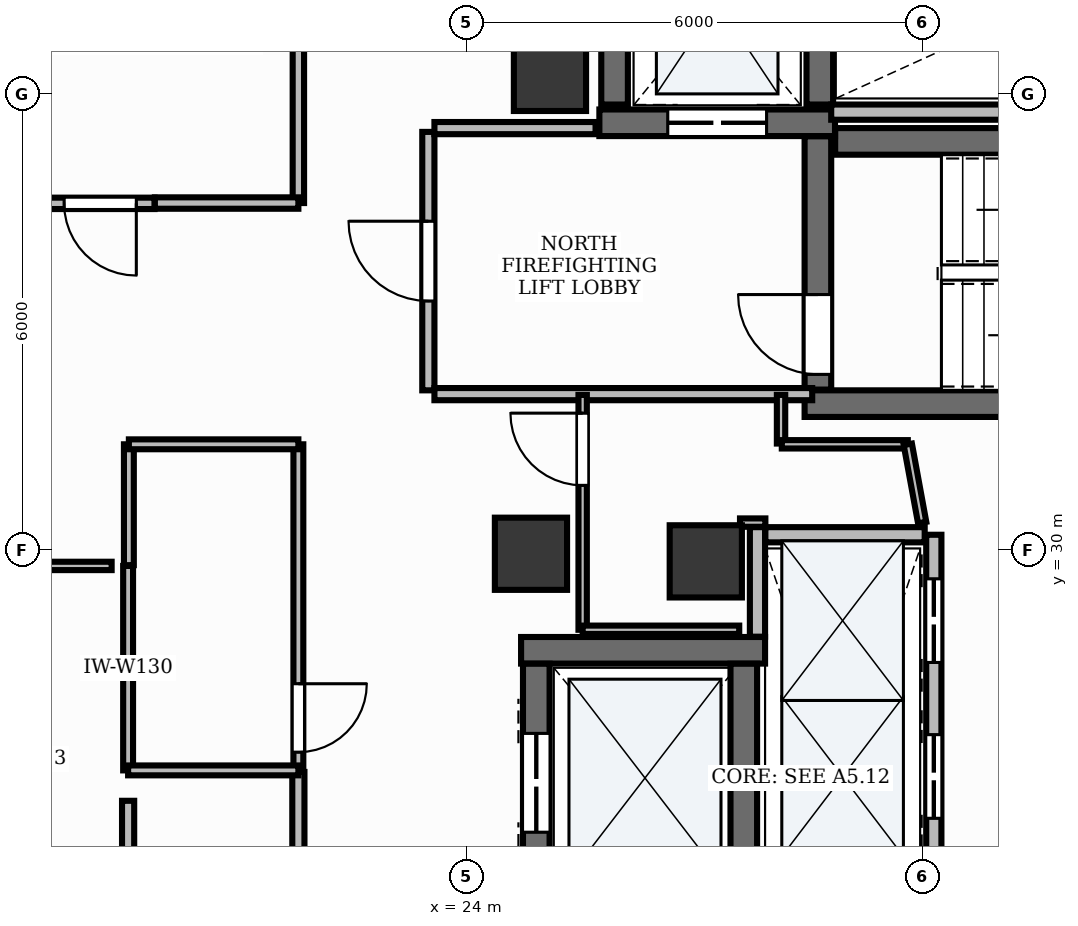
"""IFC4 building model, lengths in metres.
Left out: names, types, materials, properties, quantities, classifications, styles, units other than length and angle.
Written with IfcOpenShell. Run it as: python <this file> out.ifc"""

import sys

from ifc_helpers import new_model, si_unit, direction, frame, frame_2d, origin, origin_2d, place, context, subcontext, project, spatial, rectangle, extrude, element, fill, save


model = new_model("IFC4")
c1 = context("Model", 3, precision=1e-05, world=origin(), true_north=direction((0.0, 1.0)))
c2 = subcontext(c1, "Body", "Model", "MODEL_VIEW")
j1 = project(units=[si_unit("LENGTHUNIT", "METRE"), si_unit("PLANEANGLEUNIT", "RADIAN")], contexts=[c1])
p1 = place(None, origin())
s1 = spatial("IfcSite", under=j1, at=p1, CompositionType="ELEMENT")
p2 = place(p1, origin())
s2 = spatial("IfcBuilding", under=s1, at=p2, CompositionType="ELEMENT")
p3 = place(p2, frame((0.0, 0.0, 282.6)))
s3 = spatial("IfcBuildingStorey", under=s2, at=p3, CompositionType="ELEMENT", Elevation=282.6)
p4 = place(p3, frame((28.852, 35.375, 0.0), z_axis=(0.0, 0.0, 1.0), x_axis=(1.0, 0.0, 0.0)))
e1 = element("IfcWall", 1, at=p4, inside=s3, PredefinedType="SHEAR", context=c2, shape_type="SweptSolid", body=[
    extrude(rectangle(XDim=8.148, YDim=0.35, at=frame_2d((4.074, 0.0))), origin(), (0.0, 0.0, 1.0), 3.79),
])
p5 = place(p3, frame((28.45, 31.925, 0.0), z_axis=(0.0, 0.0, 1.0), x_axis=(1.0, 0.0, 0.0)))
e2 = element("IfcWall", 2, at=p5, inside=s3, PredefinedType="SHEAR", context=c2, shape_type="SweptSolid", body=[
    extrude(rectangle(XDim=8.55, YDim=0.35, at=frame_2d((4.275, 0.0))), origin(), (0.0, 0.0, 1.0), 3.79),
])
p6 = place(p3, frame((28.625, 32.11, 0.0), z_axis=(0.0, 0.0, 1.0), x_axis=(0.0, 1.0, 0.0)))
e3 = element("IfcWall", 3, at=p6, inside=s3, PredefinedType="SHEAR", context=c2, shape_type="SweptSolid", body=[
    extrude(rectangle(XDim=3.333, YDim=0.35, at=frame_2d((1.667, 0.0))), origin(), (0.0, 0.0, 1.0), 3.79),
])
p7 = place(p6, frame((0.2, 0.0, 0.0)))
e4 = element("IfcOpeningElement", 4, at=p7, cuts=e3, PredefinedType="OPENING", context=c2, shape_type="SweptSolid", body=[
    extrude(rectangle(XDim=1.05, YDim=2.15, at=frame_2d((0.525, 1.075))), frame((0.0, 0.19, 0.0), z_axis=(0.0, -1.0, 0.0), x_axis=(1.0, 0.0, 0.0)), (0.0, 0.0, 1.0), 0.38),
])
p8 = place(p3, frame((25.75, 35.62, 0.0), z_axis=(0.0, 0.0, 1.0), x_axis=(1.0, 0.0, 0.0)))
e5 = element("IfcWall", 5, at=p8, inside=s3, PredefinedType="SHEAR", context=c2, shape_type="SweptSolid", body=[
    extrude(rectangle(XDim=3.1, YDim=0.35, at=frame_2d((1.55, 0.0))), origin(), (0.0, 0.0, 1.0), 3.79),
])
p9 = place(p8, frame((0.9, 0.0, 0.0)))
e6 = element("IfcOpeningElement", 6, at=p9, cuts=e5, PredefinedType="OPENING", context=c2, shape_type="SweptSolid", body=[
    extrude(rectangle(XDim=1.3, YDim=2.2, at=frame_2d((0.65, 1.1))), frame((0.0, 0.19, 0.0), z_axis=(0.0, -1.0, 0.0), x_axis=(1.0, 0.0, 0.0)), (0.0, 0.0, 1.0), 0.38),
])
for number, where, z_axis, x_axis in (
    (7, (25.95, 35.86, 0.0), (0.0, 0.0, 1.0), (0.0, 1.0, 0.0)),
    (8, (28.65, 35.86, 0.0), (0.0, 0.0, 1.0), (0.0, 1.0, 0.0)),
):
    element("IfcWall", number, at=place(p3, frame(where, z_axis=z_axis, x_axis=x_axis)), inside=s3, PredefinedType="SHEAR", context=c2, shape_type="SweptSolid", body=[
        extrude(rectangle(XDim=2.7, YDim=0.35, at=frame_2d((1.35, 0.0))), origin(), (0.0, 0.0, 1.0), 3.79),
    ])
p10 = place(p3, frame((24.72, 28.68, 0.0), z_axis=(0.0, 0.0, 1.0), x_axis=(1.0, 0.0, 0.0)))
e9 = element("IfcWall", 9, at=p10, inside=s3, PredefinedType="SHEAR", context=c2, shape_type="SweptSolid", body=[
    extrude(rectangle(XDim=3.21, YDim=0.35, at=frame_2d((1.605, 0.0))), origin(), (0.0, 0.0, 1.0), 3.79),
])
p11 = place(p3, frame((24.92, 25.497, 0.0), z_axis=(0.0, 0.0, 1.0), x_axis=(0.0, 1.0, 0.0)))
e10 = element("IfcWall", 10, at=p11, inside=s3, PredefinedType="SHEAR", context=c2, shape_type="SweptSolid", body=[
    extrude(rectangle(XDim=3.006, YDim=0.35, at=frame_2d((1.503, 0.0))), origin(), (0.0, 0.0, 1.0), 3.79),
])
p12 = place(p11, frame((0.79, 0.0, 0.0)))
e11 = element("IfcOpeningElement", 11, at=p12, cuts=e10, PredefinedType="OPENING", context=c2, shape_type="SweptSolid", body=[
    extrude(rectangle(XDim=1.3, YDim=2.2, at=frame_2d((0.65, 1.1))), frame((0.0, 0.19, 0.0), z_axis=(0.0, -1.0, 0.0), x_axis=(1.0, 0.0, 0.0)), (0.0, 0.0, 1.0), 0.38),
])
p13 = place(p3, frame((27.65, 25.497, 0.0), z_axis=(0.0, 0.0, 1.0), x_axis=(0.0, 1.0, 0.0)))
e12 = element("IfcWall", 12, at=p13, inside=s3, PredefinedType="SHEAR", context=c2, shape_type="SweptSolid", body=[
    extrude(rectangle(XDim=3.006, YDim=0.35, at=frame_2d((1.503, 0.0))), origin(), (0.0, 0.0, 1.0), 3.79),
])
for number, where, z_axis, x_axis in (
    (13, (25.1, 36.25, -0.0), (0.0, 0.0, 1.0), (1.0, 0.0, 0.0)),
    (14, (24.85, 29.95, -0.0), (0.0, 0.0, 1.0), (1.0, 0.0, 0.0)),
    (15, (27.15, 29.85, -0.0), (0.0, 0.0, 1.0), (1.0, 0.0, 0.0)),
):
    element("IfcColumn", number, at=place(p3, frame(where, z_axis=z_axis, x_axis=x_axis)), inside=s3, PredefinedType="PILASTER", context=c2, shape_type="SweptSolid", body=[
        extrude(rectangle(XDim=0.95, YDim=0.95, at=origin_2d()), origin(), (0.0, 0.0, 1.0), 3.791),
    ])
p14 = place(p3, frame((27.83, 28.859, 0.0), z_axis=(0.0, 0.0, 1.0), x_axis=(0.0, 1.0, 0.0)))
e16 = element("IfcWall", 16, at=p14, inside=s3, PredefinedType="PARTITIONING", context=c2, shape_type="SweptSolid", body=[
    extrude(rectangle(XDim=1.441, YDim=0.2, at=frame_2d((0.721, 0.0))), origin(), (0.0, 0.0, 1.0), 2.8),
])
p15 = place(p3, frame((30.15, 23.85, 0.0), z_axis=(0.0, 0.0, 1.0), x_axis=(0.0, 1.0, 0.0)))
e17 = element("IfcWall", 17, at=p15, inside=s3, PredefinedType="PARTITIONING", context=c2, shape_type="SweptSolid", body=[
    extrude(rectangle(XDim=6.35, YDim=0.2, at=frame_2d((3.175, 0.0))), origin(), (0.0, 0.0, 1.0), 2.8),
])
p16 = place(p15, frame((0.58, 0.0, 0.0)))
e18 = element("IfcOpeningElement", 18, at=p16, cuts=e17, PredefinedType="OPENING", context=c2, shape_type="SweptSolid", body=[
    extrude(rectangle(XDim=1.1, YDim=2.2, at=frame_2d((0.55, 1.1))), frame((0.0, 0.115, 0.0), z_axis=(0.0, -1.0, 0.0), x_axis=(1.0, 0.0, 0.0)), (0.0, 0.0, 1.0), 0.23),
])
p17 = place(p15, frame((2.62, 0.0, 0.0)))
e19 = element("IfcOpeningElement", 19, at=p17, cuts=e17, PredefinedType="OPENING", context=c2, shape_type="SweptSolid", body=[
    extrude(rectangle(XDim=1.1, YDim=2.2, at=frame_2d((0.55, 1.1))), frame((0.0, 0.115, 0.0), z_axis=(0.0, -1.0, 0.0), x_axis=(1.0, 0.0, 0.0)), (0.0, 0.0, 1.0), 0.23),
])
p18 = place(p15, frame((4.67, 0.0, 0.0)))
e20 = element("IfcOpeningElement", 20, at=p18, cuts=e17, PredefinedType="OPENING", context=c2, shape_type="SweptSolid", body=[
    extrude(rectangle(XDim=1.1, YDim=2.2, at=frame_2d((0.55, 1.1))), frame((0.0, 0.115, 0.0), z_axis=(0.0, -1.0, 0.0), x_axis=(1.0, 0.0, 0.0)), (0.0, 0.0, 1.0), 0.23),
])
p19 = place(p3, frame((27.934, 30.2, 0.0), z_axis=(0.0, 0.0, 1.0), x_axis=(1.0, 0.0, 0.0)))
e21 = element("IfcWall", 21, at=p19, inside=s3, PredefinedType="PARTITIONING", context=c2, shape_type="SweptSolid", body=[
    extrude(rectangle(XDim=2.096, YDim=0.2, at=frame_2d((1.048, 0.0))), origin(), (0.0, 0.0, 1.0), 2.8),
])
p20 = place(p3, frame((28.8, 35.76, 0.0), z_axis=(0.0, 0.0, 1.0), x_axis=(1.0, 0.0, 0.0)))
e22 = element("IfcWall", 22, at=p20, inside=s3, PredefinedType="PARTITIONING", context=c2, shape_type="SweptSolid", body=[
    extrude(rectangle(XDim=4.57, YDim=0.2, at=frame_2d((2.285, 0.0))), origin(), (0.0, 0.0, 1.0), 2.8),
])
p21 = place(p3, frame((23.5, 32.1, 0.0), z_axis=(0.0, 0.0, 1.0), x_axis=(0.0, 1.0, 0.0)))
e23 = element("IfcWall", 23, at=p21, inside=s3, PredefinedType="PARTITIONING", context=c2, shape_type="SweptSolid", body=[
    extrude(rectangle(XDim=3.4, YDim=0.16, at=frame_2d((1.7, 0.0))), origin(), (0.0, 0.0, 1.0), 2.8),
])
p22 = place(p21, frame((1.175, 0.0, 0.0)))
e24 = element("IfcOpeningElement", 24, at=p22, cuts=e23, PredefinedType="OPENING", context=c2, shape_type="SweptSolid", body=[
    extrude(rectangle(XDim=1.05, YDim=2.15, at=frame_2d((0.525, 1.075))), frame((0.0, 0.095, 0.0), z_axis=(0.0, -1.0, 0.0), x_axis=(1.0, 0.0, 0.0)), (0.0, 0.0, 1.0), 0.19),
])
p23 = place(p3, frame((23.58, 32.05, 0.0), z_axis=(0.0, 0.0, 1.0), x_axis=(1.0, 0.0, 0.0)))
e25 = element("IfcWall", 25, at=p23, inside=s3, PredefinedType="PARTITIONING", context=c2, shape_type="SweptSolid", body=[
    extrude(rectangle(XDim=4.97, YDim=0.16, at=frame_2d((2.485, 0.0))), origin(), (0.0, 0.0, 1.0), 2.8),
])
p24 = place(p3, frame((23.58, 35.55, 0.0), z_axis=(0.0, 0.0, 1.0), x_axis=(1.0, 0.0, 0.0)))
e26 = element("IfcWall", 26, at=p24, inside=s3, PredefinedType="PARTITIONING", context=c2, shape_type="SweptSolid", body=[
    extrude(rectangle(XDim=2.12, YDim=0.16, at=frame_2d((1.06, 0.0))), origin(), (0.0, 0.0, 1.0), 2.8),
])
p25 = place(p3, frame((21.79, 31.39, 0.0), z_axis=(0.0, 0.0, 1.0), x_axis=(0.0, -1.0, 0.0)))
e27 = element("IfcWall", 27, at=p25, inside=s3, PredefinedType="PARTITIONING", context=c2, shape_type="SweptSolid", body=[
    extrude(rectangle(XDim=4.29, YDim=0.13, at=frame_2d((2.145, 0.0))), origin(), (0.0, 0.0, 1.0), 2.8),
])
p26 = place(p25, frame((3.15, 0.0, 0.0)))
e28 = element("IfcOpeningElement", 28, at=p26, cuts=e27, PredefinedType="OPENING", context=c2, shape_type="SweptSolid", body=[
    extrude(rectangle(XDim=0.9, YDim=2.15, at=frame_2d((0.45, 1.075))), frame((0.0, 0.08, 0.0), z_axis=(0.0, -1.0, 0.0), x_axis=(1.0, 0.0, 0.0)), (0.0, 0.0, 1.0), 0.16),
])
p27 = place(p3, frame((25.53, 28.95, 0.0), z_axis=(0.0, 0.0, 1.0), x_axis=(0.0, 1.0, 0.0)))
e29 = element("IfcWall", 29, at=p27, inside=s3, PredefinedType="MOVABLE", context=c2, shape_type="SweptSolid", body=[
    extrude(rectangle(XDim=3.09, YDim=0.11, at=frame_2d((1.545, 0.0))), origin(), (0.0, 0.0, 1.0), 2.8),
])
p28 = place(p27, frame((1.9, 0.0, 0.0)))
e30 = element("IfcOpeningElement", 30, at=p28, cuts=e29, PredefinedType="OPENING", context=c2, shape_type="SweptSolid", body=[
    extrude(rectangle(XDim=0.95, YDim=2.15, at=frame_2d((0.475, 1.075))), frame((0.0, 0.07, 0.0), z_axis=(0.0, -1.0, 0.0), x_axis=(1.0, 0.0, 0.0)), (0.0, 0.0, 1.0), 0.14),
])
p29 = place(p3, frame((19.898, 34.56, 0.0), z_axis=(0.0, 0.0, 1.0), x_axis=(-1.0, 0.0, 0.0)))
e31 = element("IfcWall", 31, at=p29, inside=s3, PredefinedType="PARTITIONING", context=c2, shape_type="SweptSolid", body=[
    extrude(rectangle(XDim=2.098, YDim=0.15, at=frame_2d((1.049, 0.0))), origin(), (0.0, 0.0, 1.0), 2.8),
])
p30 = place(p29, frame((0.24, 0.0, 0.0)))
e32 = element("IfcOpeningElement", 32, at=p30, cuts=e31, PredefinedType="OPENING", context=c2, shape_type="SweptSolid", body=[
    extrude(rectangle(XDim=0.95, YDim=2.15, at=frame_2d((0.475, 1.075))), frame((0.0, 0.09, 0.0), z_axis=(0.0, -1.0, 0.0), x_axis=(1.0, 0.0, 0.0)), (0.0, 0.0, 1.0), 0.18),
])
p31 = place(p3, frame((14.8, 29.79, 0.0), z_axis=(0.0, 0.0, 1.0), x_axis=(1.0, 0.0, 0.0)))
e33 = element("IfcWall", 33, at=p31, inside=s3, PredefinedType="MOVABLE", context=c2, shape_type="SweptSolid", body=[
    extrude(rectangle(XDim=4.533, YDim=0.11, at=frame_2d((2.267, 0.0))), origin(), (0.0, 0.0, 1.0), 2.8),
])
p32 = place(p31, frame((0.502, 0.0, 0.0)))
e34 = element("IfcOpeningElement", 34, at=p32, cuts=e33, PredefinedType="OPENING", context=c2, shape_type="SweptSolid", body=[
    extrude(rectangle(XDim=0.95, YDim=2.15, at=frame_2d((0.475, 1.075))), frame((0.0, 0.07, 0.0), z_axis=(0.0, -1.0, 0.0), x_axis=(1.0, 0.0, 0.0)), (0.0, 0.0, 1.0), 0.14),
])
p33 = place(p3, frame((21.79, 27.08, 0.0), z_axis=(0.0, 0.0, 1.0), x_axis=(0.0, -1.0, 0.0)))
e35 = element("IfcWall", 35, at=p33, inside=s3, PredefinedType="PARTITIONING", context=c2, shape_type="SweptSolid", body=[
    extrude(rectangle(XDim=4.67, YDim=0.16, at=frame_2d((2.335, 0.0))), origin(), (0.0, 0.0, 1.0), 2.8),
])
p34 = place(p3, frame((19.55, 24.21, 0.0), z_axis=(0.0, 0.0, 1.0), x_axis=(0.0, 1.0, 0.0)))
e36 = element("IfcWall", 36, at=p34, inside=s3, PredefinedType="PARTITIONING", context=c2, shape_type="SweptSolid", body=[
    extrude(rectangle(XDim=2.49, YDim=0.16, at=frame_2d((1.245, 0.0))), origin(), (0.0, 0.0, 1.0), 2.8),
])
p35 = place(p3, frame((19.55, 27.1, 0.0), z_axis=(0.0, 0.0, 1.0), x_axis=(0.0, 1.0, 0.0)))
e37 = element("IfcWall", 37, at=p35, inside=s3, PredefinedType="PARTITIONING", context=c2, shape_type="SweptSolid", body=[
    extrude(rectangle(XDim=2.69, YDim=0.13, at=frame_2d((1.345, 0.0))), origin(), (0.0, 0.0, 1.0), 2.8),
])
p36 = place(p3, frame((19.56, 29.8, 0.0), z_axis=(0.0, 0.0, 1.0), x_axis=(0.0, 1.0, 0.0)))
e38 = element("IfcWall", 38, at=p36, inside=s3, PredefinedType="PARTITIONING", context=c2, shape_type="SweptSolid", body=[
    extrude(rectangle(XDim=1.59, YDim=0.13, at=frame_2d((0.795, 0.0))), origin(), (0.0, 0.0, 1.0), 2.8),
])
p37 = place(p3, frame((19.56, 31.39, 0.0), z_axis=(0.0, 0.0, 1.0), x_axis=(1.0, 0.0, 0.0)))
e39 = element("IfcWall", 39, at=p37, inside=s3, PredefinedType="PARTITIONING", context=c2, shape_type="SweptSolid", body=[
    extrude(rectangle(XDim=2.23, YDim=0.13, at=frame_2d((1.115, 0.0))), origin(), (0.0, 0.0, 1.0), 2.8),
])
p38 = place(p3, frame((21.79, 27.1, 0.0), z_axis=(0.0, 0.0, 1.0), x_axis=(-1.0, 0.0, 0.0)))
e40 = element("IfcWall", 40, at=p38, inside=s3, PredefinedType="PARTITIONING", context=c2, shape_type="SweptSolid", body=[
    extrude(rectangle(XDim=2.24, YDim=0.13, at=frame_2d((1.12, 0.0))), origin(), (0.0, 0.0, 1.0), 2.8),
])
p39 = place(p3, frame((27.934, 30.36, 0.0), z_axis=(0.0, 0.0, 1.0), x_axis=(-1.0, 0.0, 0.0)))
e41 = element("IfcWall", 41, at=p39, inside=s3, PredefinedType="MOVABLE", context=c2, shape_type="SweptSolid", body=[
    extrude(rectangle(XDim=0.334, YDim=0.11, at=frame_2d((0.167, 0.0))), origin(), (0.0, 0.0, 1.0), 2.8),
])
p40 = place(p3, frame((27.59, 28.95, 0.0), z_axis=(0.0, 0.0, 1.0), x_axis=(-1.0, 0.0, 0.0)))
e42 = element("IfcWall", 42, at=p40, inside=s3, PredefinedType="MOVABLE", context=c2, shape_type="SweptSolid", body=[
    extrude(rectangle(XDim=2.06, YDim=0.11, at=frame_2d((1.03, 0.0))), origin(), (0.0, 0.0, 1.0), 2.8),
])
p41 = place(p3, frame((28.14, 32.04, 0.0), z_axis=(0.0, 0.0, 1.0), x_axis=(0.0, -1.0, 0.0)))
e43 = element("IfcWall", 43, at=p41, inside=s3, PredefinedType="MOVABLE", context=c2, shape_type="SweptSolid", body=[
    extrude(rectangle(XDim=0.64, YDim=0.11, at=frame_2d((0.32, 0.0))), origin(), (0.0, 0.0, 1.0), 2.8),
])
p42 = place(p3, frame((28.15, 31.39, 0.0), z_axis=(0.0, 0.0, 1.0), x_axis=(1.0, 0.0, 0.0)))
e44 = element("IfcWall", 44, at=p42, inside=s3, PredefinedType="MOVABLE", context=c2, shape_type="SweptSolid", body=[
    extrude(rectangle(XDim=1.658, YDim=0.11, at=frame_2d((0.829, 0.0))), origin(), (0.0, 0.0, 1.0), 2.8),
])
p43 = place(p3, frame((29.808, 31.39, 0.0), z_axis=(0.0, 0.0, 1.0), x_axis=(0.180485788632, -0.983577592314, 0.0)))
e45 = element("IfcWall", 45, at=p43, inside=s3, PredefinedType="MOVABLE", context=c2, shape_type="SweptSolid", body=[
    extrude(rectangle(XDim=1.047, YDim=0.11, at=frame_2d((0.523, 0.0))), origin(), (0.0, 0.0, 1.0), 2.8),
])
p44 = place(p3, frame((21.79, 37.474, 0.0), z_axis=(0.0, 0.0, 1.0), x_axis=(0.0, -1.0, 0.0)))
e46 = element("IfcWall", 46, at=p44, inside=s3, PredefinedType="PARTITIONING", context=c2, shape_type="SweptSolid", body=[
    extrude(rectangle(XDim=2.91, YDim=0.15, at=frame_2d((1.455, 0.0))), origin(), (0.0, 0.0, 1.0), 2.8),
])
p45 = place(p3, frame((21.79, 34.564, 0.0), z_axis=(0.0, 0.0, 1.0), x_axis=(-1.0, 0.0, 0.0)))
e47 = element("IfcWall", 47, at=p45, inside=s3, PredefinedType="PARTITIONING", context=c2, shape_type="SweptSolid", body=[
    extrude(rectangle(XDim=1.888, YDim=0.15, at=frame_2d((0.944, 0.0))), origin(), (0.0, 0.0, 1.0), 2.8),
])
p46 = place(p7, origin())
e48 = element("IfcDoor", 48, at=p46, inside=s3, OperationType="SINGLE_SWING_RIGHT", PredefinedType="DOOR", context=c2, shape_type="SweptSolid", body=[
    extrude(rectangle(XDim=1.05, YDim=2.15, at=frame_2d((0.525, 1.075))), frame((0.0, 0.025, 0.0), z_axis=(0.0, -1.0, 0.0), x_axis=(1.0, 0.0, 0.0)), (0.0, 0.0, 1.0), 0.05),
])
fill(e4, e48)
p47 = place(p17, origin())
e49 = element("IfcDoor", 49, at=p47, inside=s3, OperationType="DOUBLE_DOOR_SLIDING", PredefinedType="DOOR", context=c2, shape_type="SweptSolid", body=[
    extrude(rectangle(XDim=1.1, YDim=2.2, at=frame_2d((0.55, 1.1))), frame((0.0, 0.025, 0.0), z_axis=(0.0, -1.0, 0.0), x_axis=(1.0, 0.0, 0.0)), (0.0, 0.0, 1.0), 0.05),
])
fill(e19, e49)
p48 = place(p18, origin())
e50 = element("IfcDoor", 50, at=p48, inside=s3, OperationType="DOUBLE_DOOR_SLIDING", PredefinedType="DOOR", context=c2, shape_type="SweptSolid", body=[
    extrude(rectangle(XDim=1.1, YDim=2.2, at=frame_2d((0.55, 1.1))), frame((0.0, 0.025, 0.0), z_axis=(0.0, -1.0, 0.0), x_axis=(1.0, 0.0, 0.0)), (0.0, 0.0, 1.0), 0.05),
])
fill(e20, e50)
p49 = place(p9, origin())
e51 = element("IfcDoor", 51, at=p49, inside=s3, OperationType="DOUBLE_DOOR_SLIDING", PredefinedType="DOOR", context=c2, shape_type="SweptSolid", body=[
    extrude(rectangle(XDim=1.3, YDim=2.2, at=frame_2d((0.65, 1.1))), frame((0.0, 0.025, 0.0), z_axis=(0.0, -1.0, 0.0), x_axis=(1.0, 0.0, 0.0)), (0.0, 0.0, 1.0), 0.05),
])
fill(e6, e51)
p50 = place(p12, origin())
e52 = element("IfcDoor", 52, at=p50, inside=s3, OperationType="DOUBLE_DOOR_SLIDING", PredefinedType="DOOR", context=c2, shape_type="SweptSolid", body=[
    extrude(rectangle(XDim=1.3, YDim=2.2, at=frame_2d((0.65, 1.1))), frame((0.0, 0.025, 0.0), z_axis=(0.0, -1.0, 0.0), x_axis=(1.0, 0.0, 0.0)), (0.0, 0.0, 1.0), 0.05),
])
fill(e11, e52)
p51 = place(p22, origin())
e53 = element("IfcDoor", 53, at=p51, inside=s3, OperationType="SINGLE_SWING_RIGHT", PredefinedType="DOOR", context=c2, shape_type="SweptSolid", body=[
    extrude(rectangle(XDim=1.05, YDim=2.15, at=frame_2d((0.525, 1.075))), frame((0.0, 0.025, 0.0), z_axis=(0.0, -1.0, 0.0), x_axis=(1.0, 0.0, 0.0)), (0.0, 0.0, 1.0), 0.05),
])
fill(e24, e53)
p52 = place(p26, origin())
e54 = element("IfcDoor", 54, at=p52, inside=s3, OperationType="SINGLE_SWING_LEFT", PredefinedType="DOOR", context=c2, shape_type="SweptSolid", body=[
    extrude(rectangle(XDim=0.9, YDim=2.15, at=frame_2d((0.45, 1.075))), frame((0.0, 0.025, 0.0), z_axis=(0.0, -1.0, 0.0), x_axis=(1.0, 0.0, 0.0)), (0.0, 0.0, 1.0), 0.05),
])
fill(e28, e54)
p53 = place(p28, origin())
e55 = element("IfcDoor", 55, at=p53, inside=s3, OperationType="SINGLE_SWING_RIGHT", PredefinedType="DOOR", context=c2, shape_type="SweptSolid", body=[
    extrude(rectangle(XDim=0.95, YDim=2.15, at=frame_2d((0.475, 1.075))), frame((0.0, 0.025, 0.0), z_axis=(0.0, -1.0, 0.0), x_axis=(1.0, 0.0, 0.0)), (0.0, 0.0, 1.0), 0.05),
])
fill(e30, e55)
p54 = place(p30, origin())
e56 = element("IfcDoor", 56, at=p54, inside=s3, OperationType="SINGLE_SWING_LEFT", PredefinedType="DOOR", context=c2, shape_type="SweptSolid", body=[
    extrude(rectangle(XDim=0.95, YDim=2.15, at=frame_2d((0.475, 1.075))), frame((0.0, 0.025, 0.0), z_axis=(0.0, -1.0, 0.0), x_axis=(1.0, 0.0, 0.0)), (0.0, 0.0, 1.0), 0.05),
])
fill(e32, e56)
save(model, sys.argv[1])
